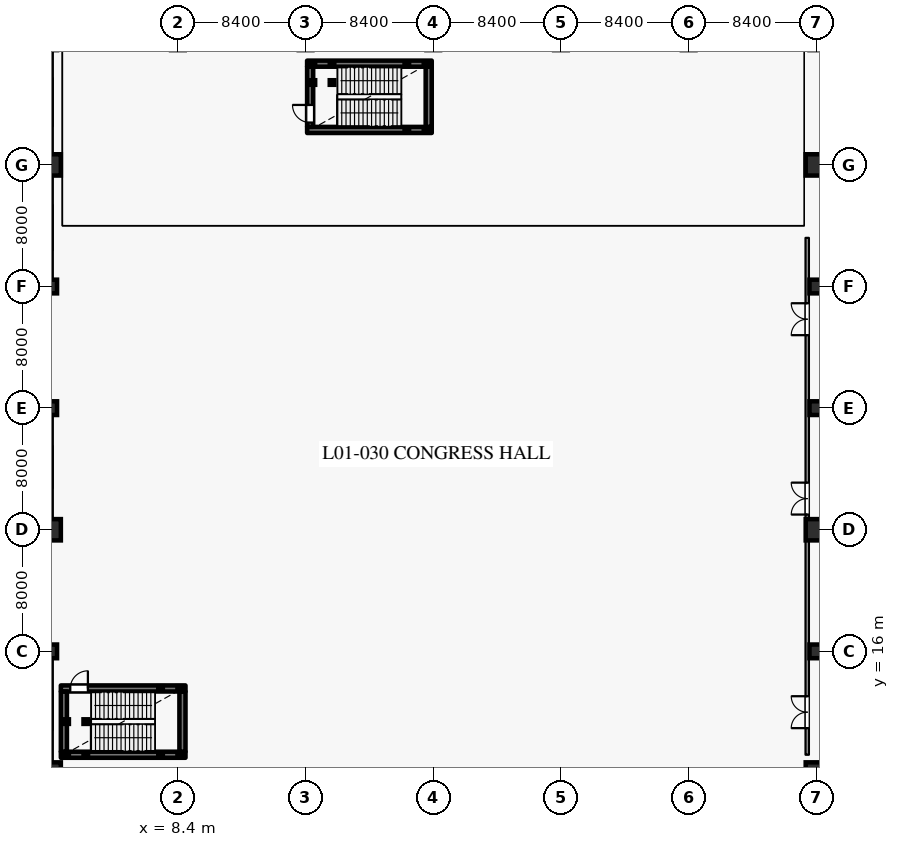
"""IFC4 building model, lengths in metres.
Left out: names, types, materials, properties, quantities, classifications, styles, units other than length and angle.
Written with IfcOpenShell. Run it as: python <this file> out.ifc"""

import sys

from ifc_helpers import new_model, si_unit, direction, frame, frame_2d, origin, origin_2d, place, context, subcontext, project, spatial, rectangle, hollow_rectangle, circle, extrude, element, fill, save


model = new_model("IFC4")
c1 = context("Model", 3, precision=1e-05, world=origin(), true_north=direction((0.0, 1.0)))
c2 = subcontext(c1, "Body", "Model", "MODEL_VIEW")
j1 = project(units=[si_unit("LENGTHUNIT", "METRE"), si_unit("PLANEANGLEUNIT", "RADIAN")], contexts=[c1])
p1 = place(None, origin())
s1 = spatial("IfcSite", under=j1, at=p1, CompositionType="ELEMENT")
p2 = place(p1, origin())
s2 = spatial("IfcBuilding", under=s1, at=p2, CompositionType="ELEMENT")
p3 = place(p2, frame((0.0, 0.0, 6.0)))
s3 = spatial("IfcBuildingStorey", under=s2, at=p3, CompositionType="ELEMENT", Elevation=6.0)
p4 = place(p3, frame((0.0, 8.0, 0.0), z_axis=(0.0, 0.0, 1.0), x_axis=(1.0, 0.0, 0.0)))
e1 = element("IfcColumn", 1, at=p4, inside=s3, PredefinedType="COLUMN", context=c2, shape_type="SweptSolid", body=[
    extrude(circle(Radius=0.7, at=origin_2d()), origin(), (0.0, 0.0, 1.0), 5.4),
])
p5 = place(p3, frame((0.0, 16.0, 0.0), z_axis=(0.0, 0.0, 1.0), x_axis=(1.0, 0.0, 0.0)))
e2 = element("IfcColumn", 2, at=p5, inside=s3, PredefinedType="COLUMN", context=c2, shape_type="SweptSolid", body=[
    extrude(rectangle(XDim=0.9, YDim=0.9, at=origin_2d()), origin(), (0.0, 0.0, 1.0), 5.4),
])
p6 = place(p3, frame((0.0, 24.0, 0.0), z_axis=(0.0, 0.0, 1.0), x_axis=(1.0, 0.0, 0.0)))
e3 = element("IfcColumn", 3, at=p6, inside=s3, PredefinedType="COLUMN", context=c2, shape_type="SweptSolid", body=[
    extrude(circle(Radius=0.7, at=origin_2d()), origin(), (0.0, 0.0, 1.0), 5.4),
])
for number, where, z_axis, x_axis in (
    (4, (0.0, 32.0, 0.0), (0.0, 0.0, 1.0), (1.0, 0.0, 0.0)),
    (5, (0.0, 40.0, 0.0), (0.0, 0.0, 1.0), (1.0, 0.0, 0.0)),
):
    element("IfcColumn", number, at=place(p3, frame(where, z_axis=z_axis, x_axis=x_axis)), inside=s3, PredefinedType="COLUMN", context=c2, shape_type="SweptSolid", body=[
        extrude(rectangle(XDim=0.9, YDim=0.9, at=origin_2d()), origin(), (0.0, 0.0, 1.0), 5.4),
    ])
for number, where, z_axis, x_axis in (
    (6, (0.0, 48.0, 0.0), (0.0, 0.0, 1.0), (1.0, 0.0, 0.0)),
    (7, (50.4, 8.0, 0.0), (0.0, 0.0, 1.0), (1.0, 0.0, 0.0)),
):
    element("IfcColumn", number, at=place(p3, frame(where, z_axis=z_axis, x_axis=x_axis)), inside=s3, PredefinedType="COLUMN", context=c2, shape_type="SweptSolid", body=[
        extrude(circle(Radius=0.7, at=origin_2d()), origin(), (0.0, 0.0, 1.0), 5.4),
    ])
p7 = place(p3, frame((50.4, 16.0, 0.0), z_axis=(0.0, 0.0, 1.0), x_axis=(1.0, 0.0, 0.0)))
e8 = element("IfcColumn", 8, at=p7, inside=s3, PredefinedType="COLUMN", context=c2, shape_type="SweptSolid", body=[
    extrude(rectangle(XDim=0.9, YDim=0.9, at=origin_2d()), origin(), (0.0, 0.0, 1.0), 5.4),
])
p8 = place(p3, frame((50.4, 24.0, 0.0), z_axis=(0.0, 0.0, 1.0), x_axis=(1.0, 0.0, 0.0)))
e9 = element("IfcColumn", 9, at=p8, inside=s3, PredefinedType="COLUMN", context=c2, shape_type="SweptSolid", body=[
    extrude(circle(Radius=0.7, at=origin_2d()), origin(), (0.0, 0.0, 1.0), 5.4),
])
for number, where, z_axis, x_axis in (
    (10, (50.4, 32.0, 0.0), (0.0, 0.0, 1.0), (1.0, 0.0, 0.0)),
    (11, (50.4, 40.0, 0.0), (0.0, 0.0, 1.0), (1.0, 0.0, 0.0)),
):
    element("IfcColumn", number, at=place(p3, frame(where, z_axis=z_axis, x_axis=x_axis)), inside=s3, PredefinedType="COLUMN", context=c2, shape_type="SweptSolid", body=[
        extrude(rectangle(XDim=0.9, YDim=0.9, at=origin_2d()), origin(), (0.0, 0.0, 1.0), 5.4),
    ])
p9 = place(p3, frame((50.4, 48.0, 0.0), z_axis=(0.0, 0.0, 1.0), x_axis=(1.0, 0.0, 0.0)))
e12 = element("IfcColumn", 12, at=p9, inside=s3, PredefinedType="COLUMN", context=c2, shape_type="SweptSolid", body=[
    extrude(circle(Radius=0.7, at=origin_2d()), origin(), (0.0, 0.0, 1.0), 5.4),
])
p10 = place(p3, frame((0.0, 8.7, 0.0), z_axis=(0.0, 0.0, 1.0), x_axis=(0.0, 1.0, 0.0)))
e13 = element("IfcWall", 13, at=p10, inside=s3, PredefinedType="SOLIDWALL", context=c2, shape_type="SweptSolid", body=[
    extrude(rectangle(XDim=6.85, YDim=0.34, at=frame_2d((3.425, 0.0))), origin(), (0.0, 0.0, 1.0), 4.67),
])
p11 = place(p10, frame((2.125, 0.0, 1.4)))
e14 = element("IfcOpeningElement", 14, at=p11, cuts=e13, PredefinedType="OPENING", context=c2, shape_type="SweptSolid", body=[
    extrude(rectangle(XDim=2.6, YDim=1.85, at=frame_2d((1.3, 0.925))), frame((0.0, 0.18, 0.0), z_axis=(0.0, -1.0, 0.0), x_axis=(1.0, 0.0, 0.0)), (0.0, 0.0, 1.0), 0.36),
])
p12 = place(p3, frame((0.0, 24.7, 0.0), z_axis=(0.0, 0.0, 1.0), x_axis=(0.0, 1.0, 0.0)))
e15 = element("IfcWall", 15, at=p12, inside=s3, PredefinedType="SOLIDWALL", context=c2, shape_type="SweptSolid", body=[
    extrude(rectangle(XDim=6.85, YDim=0.34, at=frame_2d((3.425, 0.0))), origin(), (0.0, 0.0, 1.0), 4.67),
])
p13 = place(p12, frame((2.025, 0.0, 1.4)))
e16 = element("IfcOpeningElement", 16, at=p13, cuts=e15, PredefinedType="OPENING", context=c2, shape_type="SweptSolid", body=[
    extrude(rectangle(XDim=2.8, YDim=1.95, at=frame_2d((1.4, 0.975))), frame((0.0, 0.18, 0.0), z_axis=(0.0, -1.0, 0.0), x_axis=(1.0, 0.0, 0.0)), (0.0, 0.0, 1.0), 0.36),
])
p14 = place(p3, frame((0.0, 40.45, 0.0), z_axis=(0.0, 0.0, 1.0), x_axis=(0.0, 1.0, 0.0)))
e17 = element("IfcWall", 17, at=p14, inside=s3, PredefinedType="SOLIDWALL", context=c2, shape_type="SweptSolid", body=[
    extrude(rectangle(XDim=6.85, YDim=0.34, at=frame_2d((3.425, 0.0))), origin(), (0.0, 0.0, 1.0), 4.67),
])
p15 = place(p14, frame((1.925, 0.0, 1.4)))
e18 = element("IfcOpeningElement", 18, at=p15, cuts=e17, PredefinedType="OPENING", context=c2, shape_type="SweptSolid", body=[
    extrude(rectangle(XDim=3.0, YDim=2.2, at=frame_2d((1.5, 1.1))), frame((0.0, 0.18, 0.0), z_axis=(0.0, -1.0, 0.0), x_axis=(1.0, 0.0, 0.0)), (0.0, 0.0, 1.0), 0.36),
])
p16 = place(p3, frame((0.0, 48.7, 0.0), z_axis=(0.0, 0.0, 1.0), x_axis=(0.0, 1.0, 0.0)))
e19 = element("IfcWall", 19, at=p16, inside=s3, PredefinedType="SOLIDWALL", context=c2, shape_type="SweptSolid", body=[
    extrude(rectangle(XDim=6.85, YDim=0.34, at=frame_2d((3.425, 0.0))), origin(), (0.0, 0.0, 1.0), 4.67),
])
p17 = place(p16, frame((1.825, 0.0, 1.4)))
e20 = element("IfcOpeningElement", 20, at=p17, cuts=e19, PredefinedType="OPENING", context=c2, shape_type="SweptSolid", body=[
    extrude(rectangle(XDim=3.2, YDim=2.4, at=frame_2d((1.6, 1.2))), frame((0.0, 0.18, 0.0), z_axis=(0.0, -1.0, 0.0), x_axis=(1.0, 0.0, 0.0)), (0.0, 0.0, 1.0), 0.36),
])
p18 = place(p3, frame((0.7, 9.2, 0.0), z_axis=(0.0, 0.0, 1.0), x_axis=(1.0, 0.0, 0.0)))
e21 = element("IfcWall", 21, at=p18, inside=s3, PredefinedType="SHEAR", context=c2, shape_type="SweptSolid", body=[
    extrude(rectangle(XDim=8.2, YDim=0.4, at=frame_2d((4.1, 0.0))), origin(), (0.0, 0.0, 1.0), 5.045),
])
p19 = place(p3, frame((8.7, 9.405, 0.0), z_axis=(0.0, 0.0, 1.0), x_axis=(0.0, 1.0, 0.0)))
e22 = element("IfcWall", 22, at=p19, inside=s3, PredefinedType="SHEAR", context=c2, shape_type="SweptSolid", body=[
    extrude(rectangle(XDim=3.95, YDim=0.4, at=frame_2d((1.975, 0.0))), origin(), (0.0, 0.0, 1.0), 5.045),
])
p20 = place(p3, frame((0.7, 13.56, 0.0), z_axis=(0.0, 0.0, 1.0), x_axis=(1.0, 0.0, 0.0)))
e23 = element("IfcWall", 23, at=p20, inside=s3, PredefinedType="SHEAR", context=c2, shape_type="SweptSolid", body=[
    extrude(rectangle(XDim=8.2, YDim=0.4, at=frame_2d((4.1, 0.0))), origin(), (0.0, 0.0, 1.0), 5.045),
])
p21 = place(p20, frame((0.62, 0.0, 0.0)))
e24 = element("IfcOpeningElement", 24, at=p21, cuts=e23, PredefinedType="OPENING", context=c2, shape_type="SweptSolid", body=[
    extrude(rectangle(XDim=1.16, YDim=2.2, at=frame_2d((0.58, 1.1))), frame((0.0, 0.21, 0.0), z_axis=(0.0, -1.0, 0.0), x_axis=(1.0, 0.0, 0.0)), (0.0, 0.0, 1.0), 0.42),
])
p22 = place(p3, frame((0.9, 9.405, 0.0), z_axis=(0.0, 0.0, 1.0), x_axis=(0.0, 1.0, 0.0)))
e25 = element("IfcWall", 25, at=p22, inside=s3, PredefinedType="SHEAR", context=c2, shape_type="SweptSolid", body=[
    extrude(rectangle(XDim=3.95, YDim=0.4, at=frame_2d((1.975, 0.0))), origin(), (0.0, 0.0, 1.0), 5.045),
])
for number, where, z_axis, x_axis in (
    (26, (1.08, 9.2, 0.0), (0.0, 0.0, 1.0), (1.0, 0.0, 0.0)),
    (27, (1.08, 11.38, 0.0), (0.0, 0.0, 1.0), (1.0, 0.0, 0.0)),
    (28, (2.34, 9.2, 0.0), (0.0, 0.0, 1.0), (1.0, 0.0, 0.0)),
    (29, (2.34, 11.38, 0.0), (0.0, 0.0, 1.0), (1.0, 0.0, 0.0)),
):
    element("IfcColumn", number, at=place(p3, frame(where, z_axis=z_axis, x_axis=x_axis)), inside=s3, PredefinedType="COLUMN", context=c2, shape_type="SweptSolid", body=[
        extrude(hollow_rectangle(XDim=0.3, YDim=0.3, WallThickness=0.012, at=origin_2d()), origin(), (0.0, 0.0, 1.0), 5.22),
    ])
for number, where, z_axis, x_axis in (
    (30, (7.26, 9.2, -3.0), (0.0, 0.0, 1.0), (1.0, 0.0, 0.0)),
    (31, (7.26, 13.56, -3.0), (0.0, 0.0, 1.0), (1.0, 0.0, 0.0)),
    (32, (8.52, 9.2, -3.0), (0.0, 0.0, 1.0), (1.0, 0.0, 0.0)),
    (33, (8.52, 13.56, -3.0), (0.0, 0.0, 1.0), (1.0, 0.0, 0.0)),
):
    element("IfcColumn", number, at=place(p3, frame(where, z_axis=z_axis, x_axis=x_axis)), inside=s3, PredefinedType="COLUMN", context=c2, shape_type="SweptSolid", body=[
        extrude(hollow_rectangle(XDim=0.3, YDim=0.3, WallThickness=0.012, at=origin_2d()), origin(), (0.0, 0.0, 1.0), 5.52),
    ])
p23 = place(p3, frame((16.9, 50.3, 0.0), z_axis=(0.0, 0.0, 1.0), x_axis=(1.0, 0.0, 0.0)))
e34 = element("IfcWall", 34, at=p23, inside=s3, PredefinedType="SHEAR", context=c2, shape_type="SweptSolid", body=[
    extrude(rectangle(XDim=8.2, YDim=0.4, at=frame_2d((4.1, 0.0))), origin(), (0.0, 0.0, 1.0), 5.045),
])
p24 = place(p3, frame((24.9, 50.505, 0.0), z_axis=(0.0, 0.0, 1.0), x_axis=(0.0, 1.0, 0.0)))
e35 = element("IfcWall", 35, at=p24, inside=s3, PredefinedType="SHEAR", context=c2, shape_type="SweptSolid", body=[
    extrude(rectangle(XDim=3.95, YDim=0.4, at=frame_2d((1.975, 0.0))), origin(), (0.0, 0.0, 1.0), 5.045),
])
p25 = place(p3, frame((16.9, 54.66, 0.0), z_axis=(0.0, 0.0, 1.0), x_axis=(1.0, 0.0, 0.0)))
e36 = element("IfcWall", 36, at=p25, inside=s3, PredefinedType="SHEAR", context=c2, shape_type="SweptSolid", body=[
    extrude(rectangle(XDim=8.2, YDim=0.4, at=frame_2d((4.1, 0.0))), origin(), (0.0, 0.0, 1.0), 5.045),
])
p26 = place(p3, frame((17.1, 50.505, 0.0), z_axis=(0.0, 0.0, 1.0), x_axis=(0.0, 1.0, 0.0)))
e37 = element("IfcWall", 37, at=p26, inside=s3, PredefinedType="SHEAR", context=c2, shape_type="SweptSolid", body=[
    extrude(rectangle(XDim=3.95, YDim=0.4, at=frame_2d((1.975, 0.0))), origin(), (0.0, 0.0, 1.0), 5.045),
])
p27 = place(p26, frame((0.28, 0.0, 0.0)))
e38 = element("IfcOpeningElement", 38, at=p27, cuts=e37, PredefinedType="OPENING", context=c2, shape_type="SweptSolid", body=[
    extrude(rectangle(XDim=1.16, YDim=2.2, at=frame_2d((0.58, 1.1))), frame((0.0, 0.21, 0.0), z_axis=(0.0, -1.0, 0.0), x_axis=(1.0, 0.0, 0.0)), (0.0, 0.0, 1.0), 0.42),
])
for number, where, z_axis, x_axis in (
    (39, (17.28, 53.42, 0.0), (0.0, 0.0, 1.0), (1.0, 0.0, 0.0)),
    (40, (17.28, 54.66, 0.0), (0.0, 0.0, 1.0), (1.0, 0.0, 0.0)),
    (41, (18.54, 53.42, 0.0), (0.0, 0.0, 1.0), (1.0, 0.0, 0.0)),
    (42, (18.54, 54.66, 0.0), (0.0, 0.0, 1.0), (1.0, 0.0, 0.0)),
):
    element("IfcColumn", number, at=place(p3, frame(where, z_axis=z_axis, x_axis=x_axis)), inside=s3, PredefinedType="COLUMN", context=c2, shape_type="SweptSolid", body=[
        extrude(hollow_rectangle(XDim=0.3, YDim=0.3, WallThickness=0.012, at=origin_2d()), origin(), (0.0, 0.0, 1.0), 5.22),
    ])
for number, where, z_axis, x_axis in (
    (43, (23.46, 50.3, -3.0), (0.0, 0.0, 1.0), (1.0, 0.0, 0.0)),
    (44, (23.46, 54.66, -3.0), (0.0, 0.0, 1.0), (1.0, 0.0, 0.0)),
    (45, (24.72, 50.3, -3.0), (0.0, 0.0, 1.0), (1.0, 0.0, 0.0)),
    (46, (24.72, 54.66, -3.0), (0.0, 0.0, 1.0), (1.0, 0.0, 0.0)),
):
    element("IfcColumn", number, at=place(p3, frame(where, z_axis=z_axis, x_axis=x_axis)), inside=s3, PredefinedType="COLUMN", context=c2, shape_type="SweptSolid", body=[
        extrude(hollow_rectangle(XDim=0.3, YDim=0.3, WallThickness=0.012, at=origin_2d()), origin(), (0.0, 0.0, 1.0), 5.52),
    ])
p28 = place(p3, frame((49.8, 9.2, 0.0), z_axis=(0.0, 0.0, 1.0), x_axis=(0.0, 1.0, 0.0)))
e47 = element("IfcWall", 47, at=p28, inside=s3, PredefinedType="PARTITIONING", context=c2, shape_type="SweptSolid", body=[
    extrude(rectangle(XDim=34.0, YDim=0.22, at=frame_2d((17.0, 0.0))), origin(), (0.0, 0.0, 1.0), 5.045),
])
p29 = place(p28, frame((1.75, 0.0, 0.0)))
e48 = element("IfcOpeningElement", 48, at=p29, cuts=e47, PredefinedType="OPENING", context=c2, shape_type="SweptSolid", body=[
    extrude(rectangle(XDim=2.1, YDim=2.5, at=frame_2d((1.05, 1.25))), frame((0.0, 0.12, 0.0), z_axis=(0.0, -1.0, 0.0), x_axis=(1.0, 0.0, 0.0)), (0.0, 0.0, 1.0), 0.24),
])
p30 = place(p28, frame((15.8, 0.0, 0.0)))
e49 = element("IfcOpeningElement", 49, at=p30, cuts=e47, PredefinedType="OPENING", context=c2, shape_type="SweptSolid", body=[
    extrude(rectangle(XDim=2.1, YDim=2.5, at=frame_2d((1.05, 1.25))), frame((0.0, 0.12, 0.0), z_axis=(0.0, -1.0, 0.0), x_axis=(1.0, 0.0, 0.0)), (0.0, 0.0, 1.0), 0.24),
])
p31 = place(p28, frame((27.6, 0.0, 0.0)))
e50 = element("IfcOpeningElement", 50, at=p31, cuts=e47, PredefinedType="OPENING", context=c2, shape_type="SweptSolid", body=[
    extrude(rectangle(XDim=2.1, YDim=2.5, at=frame_2d((1.05, 1.25))), frame((0.0, 0.12, 0.0), z_axis=(0.0, -1.0, 0.0), x_axis=(1.0, 0.0, 0.0)), (0.0, 0.0, 1.0), 0.24),
])
p32 = place(p21, origin())
e51 = element("IfcDoor", 51, at=p32, inside=s3, OperationType="SINGLE_SWING_RIGHT", PredefinedType="DOOR", context=c2, shape_type="SweptSolid", body=[
    extrude(rectangle(XDim=1.16, YDim=2.2, at=frame_2d((0.58, 1.1))), frame((0.0, 0.025, 0.0), z_axis=(0.0, -1.0, 0.0), x_axis=(1.0, 0.0, 0.0)), (0.0, 0.0, 1.0), 0.05),
])
fill(e24, e51)
p33 = place(p27, origin())
e52 = element("IfcDoor", 52, at=p33, inside=s3, OperationType="SINGLE_SWING_RIGHT", PredefinedType="DOOR", context=c2, shape_type="SweptSolid", body=[
    extrude(rectangle(XDim=1.16, YDim=2.2, at=frame_2d((0.58, 1.1))), frame((0.0, 0.025, 0.0), z_axis=(0.0, -1.0, 0.0), x_axis=(1.0, 0.0, 0.0)), (0.0, 0.0, 1.0), 0.05),
])
fill(e38, e52)
p34 = place(p29, origin())
e53 = element("IfcDoor", 53, at=p34, inside=s3, OperationType="DOUBLE_DOOR_SINGLE_SWING", PredefinedType="DOOR", context=c2, shape_type="SweptSolid", body=[
    extrude(rectangle(XDim=2.1, YDim=2.5, at=frame_2d((1.05, 1.25))), frame((0.0, 0.025, 0.0), z_axis=(0.0, -1.0, 0.0), x_axis=(1.0, 0.0, 0.0)), (0.0, 0.0, 1.0), 0.05),
])
fill(e48, e53)
p35 = place(p30, origin())
e54 = element("IfcDoor", 54, at=p35, inside=s3, OperationType="DOUBLE_DOOR_SINGLE_SWING", PredefinedType="DOOR", context=c2, shape_type="SweptSolid", body=[
    extrude(rectangle(XDim=2.1, YDim=2.5, at=frame_2d((1.05, 1.25))), frame((0.0, 0.025, 0.0), z_axis=(0.0, -1.0, 0.0), x_axis=(1.0, 0.0, 0.0)), (0.0, 0.0, 1.0), 0.05),
])
fill(e49, e54)
p36 = place(p31, origin())
e55 = element("IfcDoor", 55, at=p36, inside=s3, OperationType="DOUBLE_DOOR_SINGLE_SWING", PredefinedType="DOOR", context=c2, shape_type="SweptSolid", body=[
    extrude(rectangle(XDim=2.1, YDim=2.5, at=frame_2d((1.05, 1.25))), frame((0.0, 0.025, 0.0), z_axis=(0.0, -1.0, 0.0), x_axis=(1.0, 0.0, 0.0)), (0.0, 0.0, 1.0), 0.05),
])
fill(e50, e55)
save(model, sys.argv[1])
